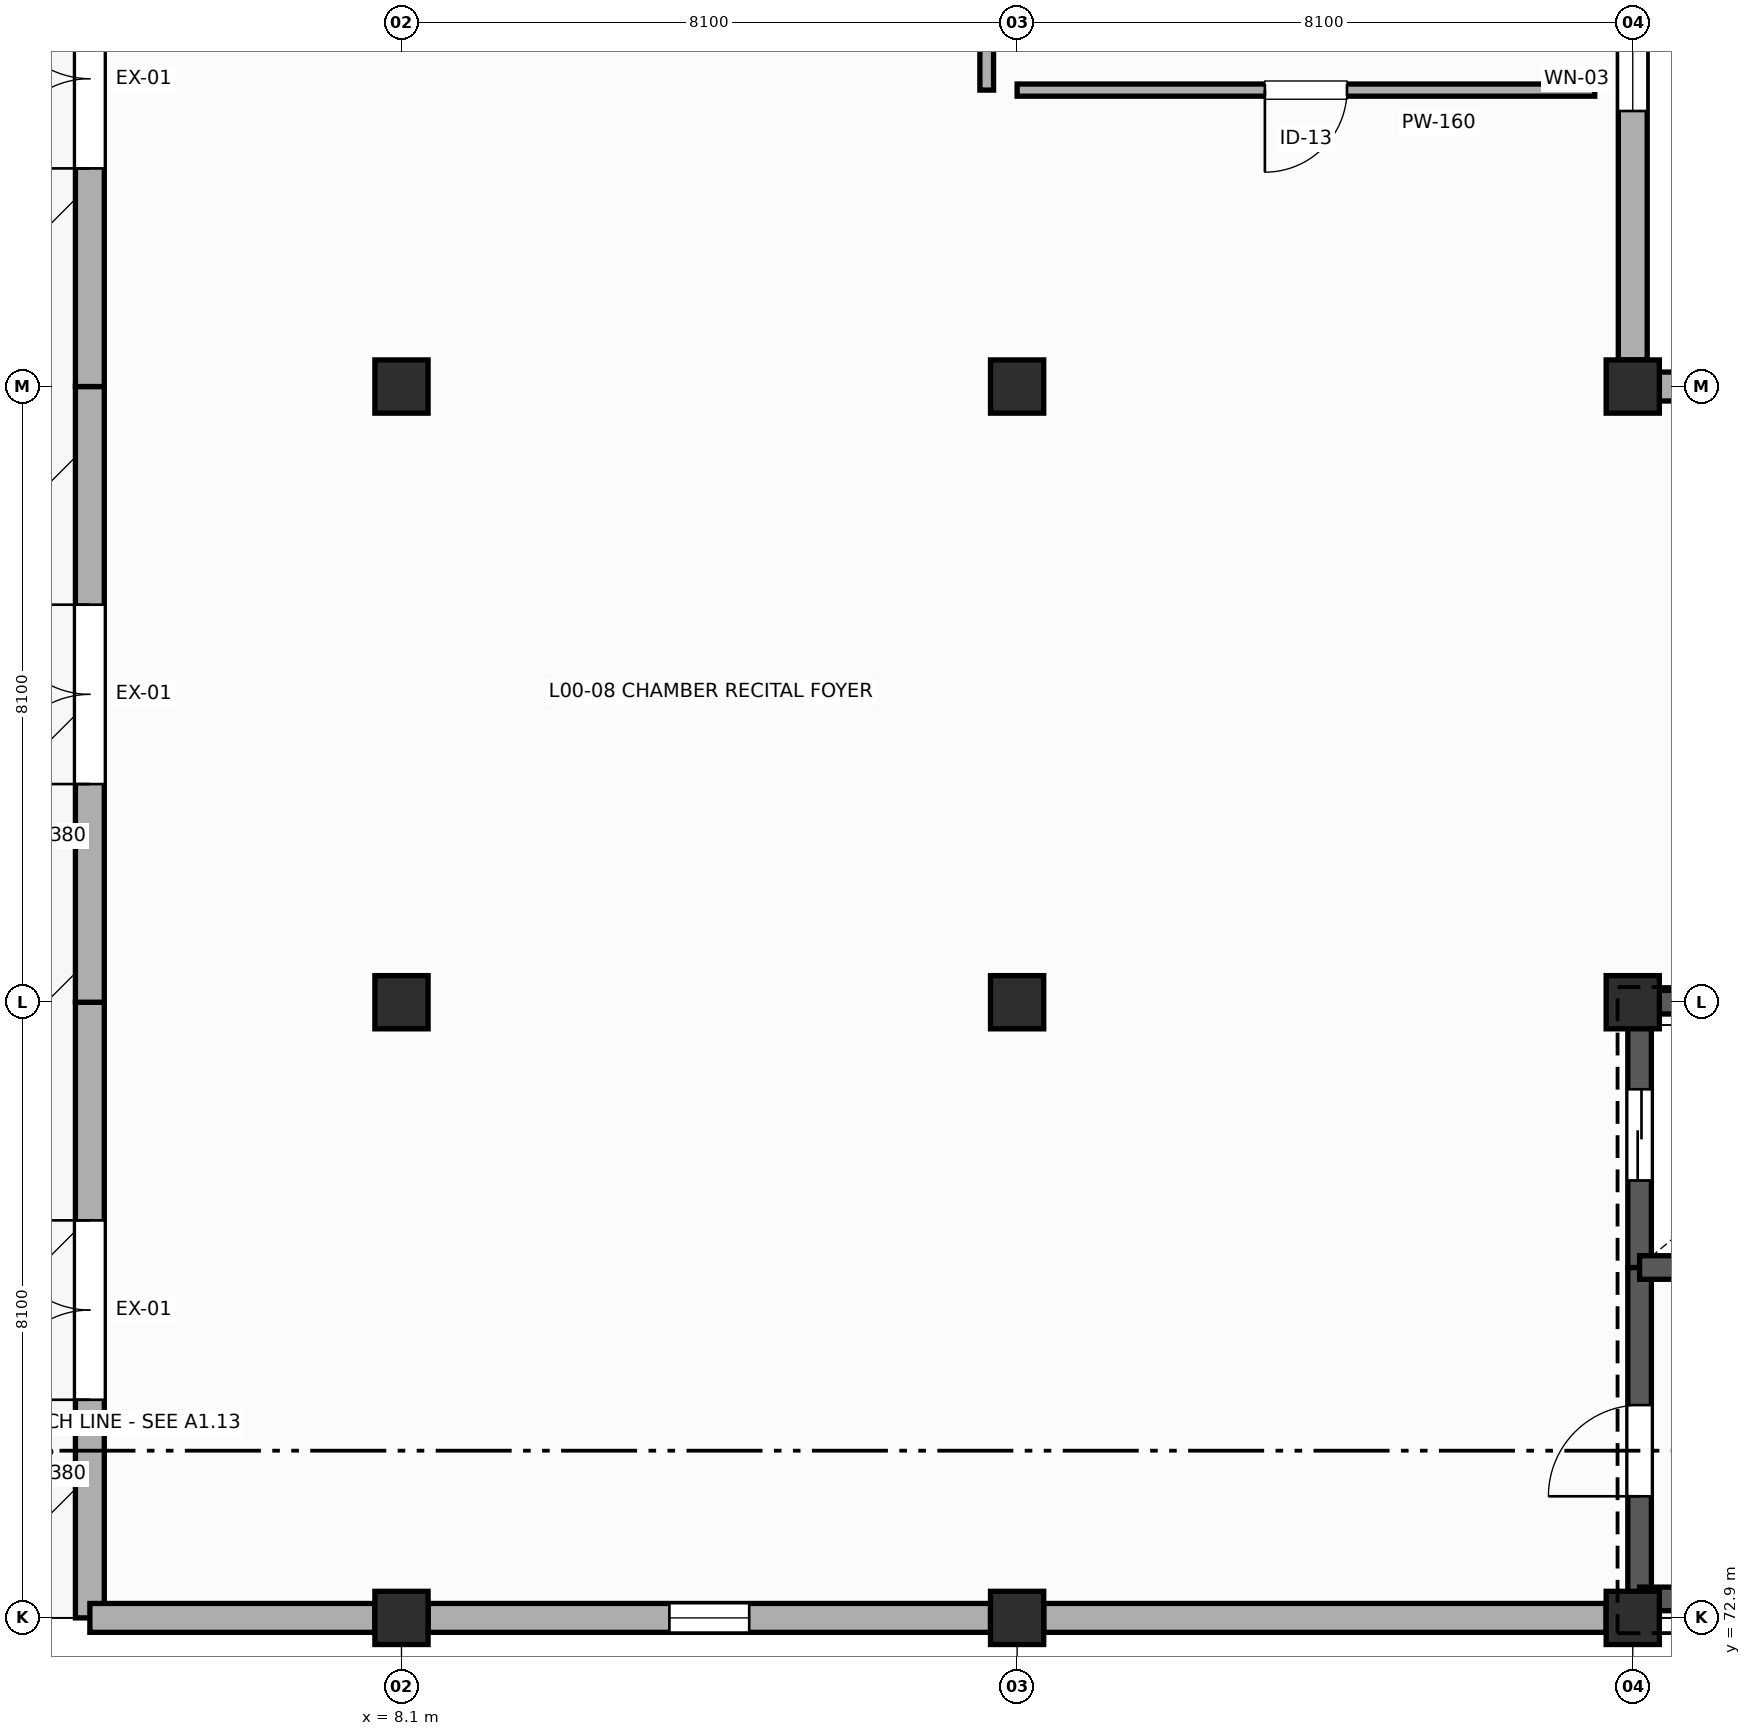
"""IFC4 building model, lengths in metres.
Left out: names, types, materials, properties, quantities, classifications, styles, units other than length and angle.
Written with IfcOpenShell. Run it as: python <this file> out.ifc"""

import sys

from ifc_helpers import new_model, si_unit, direction, frame, frame_2d, origin, origin_2d, place, context, subcontext, project, spatial, rectangle, extrude, element, fill, save


model = new_model("IFC4")
c1 = context("Model", 3, precision=1e-05, world=origin(), true_north=direction((0.0, 1.0)))
c2 = subcontext(c1, "Body", "Model", "MODEL_VIEW")
j1 = project(units=[si_unit("LENGTHUNIT", "METRE"), si_unit("PLANEANGLEUNIT", "RADIAN")], contexts=[c1])
p1 = place(None, origin())
s1 = spatial("IfcSite", under=j1, at=p1, CompositionType="ELEMENT")
p2 = place(p1, origin())
s2 = spatial("IfcBuilding", under=s1, at=p2, CompositionType="ELEMENT")
p3 = place(p2, origin())
s3 = spatial("IfcBuildingStorey", under=s2, at=p3, CompositionType="ELEMENT", Elevation=0.0)
for number, where, z_axis, x_axis in (
    (1, (8.1, 72.9, 0.0), (0.0, 0.0, 1.0), (1.0, 0.0, 0.0)),
    (2, (8.1, 81.0, 0.0), (0.0, 0.0, 1.0), (1.0, 0.0, 0.0)),
    (3, (8.1, 89.1, 0.0), (0.0, 0.0, 1.0), (1.0, 0.0, 0.0)),
    (4, (16.2, 72.9, 0.0), (0.0, 0.0, 1.0), (1.0, 0.0, 0.0)),
    (5, (16.2, 81.0, 0.0), (0.0, 0.0, 1.0), (1.0, 0.0, 0.0)),
    (6, (16.2, 89.1, 0.0), (0.0, 0.0, 1.0), (1.0, 0.0, 0.0)),
    (7, (24.3, 72.9, 0.0), (0.0, 0.0, 1.0), (1.0, 0.0, 0.0)),
    (8, (24.3, 81.0, 0.0), (0.0, 0.0, 1.0), (1.0, 0.0, 0.0)),
    (9, (24.3, 89.1, 0.0), (0.0, 0.0, 1.0), (1.0, 0.0, 0.0)),
):
    element("IfcColumn", number, at=place(p3, frame(where, z_axis=z_axis, x_axis=x_axis)), inside=s3, PredefinedType="COLUMN", context=c2, shape_type="SweptSolid", body=[
        extrude(rectangle(XDim=0.7, YDim=0.7, at=origin_2d()), origin(), (0.0, 0.0, 1.0), 5.4),
    ])
p4 = place(p3, frame((4.0, 72.9, 0.0), z_axis=(0.0, 0.0, 1.0), x_axis=(0.0, 1.0, 0.0)))
e10 = element("IfcWall", 10, at=p4, inside=s3, PredefinedType="SOLIDWALL", context=c2, shape_type="SweptSolid", body=[
    extrude(rectangle(XDim=8.1, YDim=0.38, at=frame_2d((4.05, 0.0))), origin(), (0.0, 0.0, 1.0), 5.05),
])
p5 = place(p4, frame((2.87, 0.0, 0.0)))
e11 = element("IfcOpeningElement", 11, at=p5, cuts=e10, PredefinedType="OPENING", context=c2, shape_type="SweptSolid", body=[
    extrude(rectangle(XDim=2.36, YDim=2.4, at=frame_2d((1.18, 1.2))), frame((0.0, 0.2, 0.0), z_axis=(0.0, -1.0, 0.0), x_axis=(1.0, 0.0, 0.0)), (0.0, 0.0, 1.0), 0.4),
])
p6 = place(p3, frame((4.0, 81.0, 0.0), z_axis=(0.0, 0.0, 1.0), x_axis=(0.0, 1.0, 0.0)))
e12 = element("IfcWall", 12, at=p6, inside=s3, PredefinedType="SOLIDWALL", context=c2, shape_type="SweptSolid", body=[
    extrude(rectangle(XDim=8.1, YDim=0.38, at=frame_2d((4.05, 0.0))), origin(), (0.0, 0.0, 1.0), 5.05),
])
p7 = place(p6, frame((2.87, 0.0, 0.0)))
e13 = element("IfcOpeningElement", 13, at=p7, cuts=e12, PredefinedType="OPENING", context=c2, shape_type="SweptSolid", body=[
    extrude(rectangle(XDim=2.36, YDim=2.4, at=frame_2d((1.18, 1.2))), frame((0.0, 0.2, 0.0), z_axis=(0.0, -1.0, 0.0), x_axis=(1.0, 0.0, 0.0)), (0.0, 0.0, 1.0), 0.4),
])
p8 = place(p3, frame((4.0, 89.1, 0.0), z_axis=(0.0, 0.0, 1.0), x_axis=(0.0, 1.0, 0.0)))
e14 = element("IfcWall", 14, at=p8, inside=s3, PredefinedType="SOLIDWALL", context=c2, shape_type="SweptSolid", body=[
    extrude(rectangle(XDim=8.1, YDim=0.38, at=frame_2d((4.05, 0.0))), origin(), (0.0, 0.0, 1.0), 5.05),
])
p9 = place(p8, frame((2.87, 0.0, 0.0)))
e15 = element("IfcOpeningElement", 15, at=p9, cuts=e14, PredefinedType="OPENING", context=c2, shape_type="SweptSolid", body=[
    extrude(rectangle(XDim=2.36, YDim=2.4, at=frame_2d((1.18, 1.2))), frame((0.0, 0.2, 0.0), z_axis=(0.0, -1.0, 0.0), x_axis=(1.0, 0.0, 0.0)), (0.0, 0.0, 1.0), 0.4),
])
p10 = place(p3, frame((32.0, 89.1, 0.0), z_axis=(0.0, 0.0, 1.0), x_axis=(-1.0, 0.0, 0.0)))
e16 = element("IfcWall", 16, at=p10, inside=s3, PredefinedType="SOLIDWALL", context=c2, shape_type="SweptSolid", body=[
    extrude(rectangle(XDim=7.35, YDim=0.38, at=frame_2d((3.675, 0.0))), origin(), (0.0, 0.0, 1.0), 4.625),
])
p11 = place(p10, frame((3.25, 0.0, 0.9)))
e17 = element("IfcOpeningElement", 17, at=p11, cuts=e16, PredefinedType="OPENING", context=c2, shape_type="SweptSolid", body=[
    extrude(rectangle(XDim=0.85, YDim=1.45, at=frame_2d((0.425, 0.725))), frame((0.0, 0.2, 0.0), z_axis=(0.0, -1.0, 0.0), x_axis=(1.0, 0.0, 0.0)), (0.0, 0.0, 1.0), 0.4),
])
p12 = place(p3, frame((24.3, 89.45, 0.0), z_axis=(0.0, 0.0, 1.0), x_axis=(0.0, 1.0, 0.0)))
e18 = element("IfcWall", 18, at=p12, inside=s3, PredefinedType="SOLIDWALL", context=c2, shape_type="SweptSolid", body=[
    extrude(rectangle(XDim=7.4, YDim=0.38, at=frame_2d((3.7, 0.0))), origin(), (0.0, 0.0, 1.0), 4.737),
])
p13 = place(p12, frame((3.275, 0.0, 0.9)))
e19 = element("IfcOpeningElement", 19, at=p13, cuts=e18, PredefinedType="OPENING", context=c2, shape_type="SweptSolid", body=[
    extrude(rectangle(XDim=0.85, YDim=1.75, at=frame_2d((0.425, 0.875))), frame((0.0, 0.2, 0.0), z_axis=(0.0, -1.0, 0.0), x_axis=(1.0, 0.0, 0.0)), (0.0, 0.0, 1.0), 0.4),
])
p14 = place(p3, frame((4.0, 72.9, 0.0), z_axis=(0.0, 0.0, 1.0), x_axis=(1.0, 0.0, 0.0)))
e20 = element("IfcWall", 20, at=p14, inside=s3, PredefinedType="SOLIDWALL", context=c2, shape_type="SweptSolid", body=[
    extrude(rectangle(XDim=3.75, YDim=0.38, at=frame_2d((1.875, 0.0))), origin(), (0.0, 0.0, 1.0), 4.677),
])
p15 = place(p3, frame((8.45, 72.9, 0.0), z_axis=(0.0, 0.0, 1.0), x_axis=(1.0, 0.0, 0.0)))
e21 = element("IfcWall", 21, at=p15, inside=s3, PredefinedType="SOLIDWALL", context=c2, shape_type="SweptSolid", body=[
    extrude(rectangle(XDim=7.4, YDim=0.38, at=frame_2d((3.7, 0.0))), origin(), (0.0, 0.0, 1.0), 4.625),
])
p16 = place(p15, frame((3.175, 0.0, 0.9)))
e22 = element("IfcOpeningElement", 22, at=p16, cuts=e21, PredefinedType="OPENING", context=c2, shape_type="SweptSolid", body=[
    extrude(rectangle(XDim=1.05, YDim=1.65, at=frame_2d((0.525, 0.825))), frame((0.0, 0.2, 0.0), z_axis=(0.0, -1.0, 0.0), x_axis=(1.0, 0.0, 0.0)), (0.0, 0.0, 1.0), 0.4),
])
p17 = place(p3, frame((16.55, 72.9, 0.0), z_axis=(0.0, 0.0, 1.0), x_axis=(1.0, 0.0, 0.0)))
e23 = element("IfcWall", 23, at=p17, inside=s3, PredefinedType="SOLIDWALL", context=c2, shape_type="SweptSolid", body=[
    extrude(rectangle(XDim=7.4, YDim=0.38, at=frame_2d((3.7, 0.0))), origin(), (0.0, 0.0, 1.0), 4.677),
])
p18 = place(p3, frame((24.39, 73.15, 0.0), z_axis=(0.0, 0.0, 1.0), x_axis=(0.0, 1.0, 0.0)))
e24 = element("IfcWall", 24, at=p18, inside=s3, PredefinedType="SHEAR", context=c2, shape_type="SweptSolid", body=[
    extrude(rectangle(XDim=4.36, YDim=0.31, at=frame_2d((2.18, 0.0))), origin(), (0.0, 0.0, 1.0), 5.4),
])
p19 = place(p18, frame((1.35, 0.0, 0.0)))
e25 = element("IfcOpeningElement", 25, at=p19, cuts=e24, PredefinedType="OPENING", context=c2, shape_type="SweptSolid", body=[
    extrude(rectangle(XDim=1.2, YDim=2.25, at=frame_2d((0.6, 1.125))), frame((0.0, 0.165, 0.0), z_axis=(0.0, -1.0, 0.0), x_axis=(1.0, 0.0, 0.0)), (0.0, 0.0, 1.0), 0.33),
])
p20 = place(p3, frame((24.39, 77.51, 0.0), z_axis=(0.0, 0.0, 1.0), x_axis=(0.0, 1.0, 0.0)))
e26 = element("IfcWall", 26, at=p20, inside=s3, PredefinedType="SHEAR", context=c2, shape_type="SweptSolid", body=[
    extrude(rectangle(XDim=3.49, YDim=0.31, at=frame_2d((1.745, 0.0))), origin(), (0.0, 0.0, 1.0), 5.4),
])
p21 = place(p20, frame((1.145, 0.0, 0.0)))
e27 = element("IfcOpeningElement", 27, at=p21, cuts=e26, PredefinedType="OPENING", context=c2, shape_type="SweptSolid", body=[
    extrude(rectangle(XDim=1.2, YDim=2.2, at=frame_2d((0.6, 1.1))), frame((0.0, 0.165, 0.0), z_axis=(0.0, -1.0, 0.0), x_axis=(1.0, 0.0, 0.0)), (0.0, 0.0, 1.0), 0.33),
])
p22 = place(p3, frame((24.39, 81.0, 0.0), z_axis=(0.0, 0.0, 1.0), x_axis=(1.0, 0.0, 0.0)))
e28 = element("IfcWall", 28, at=p22, inside=s3, PredefinedType="SHEAR", context=c2, shape_type="SweptSolid", body=[
    extrude(rectangle(XDim=3.96, YDim=0.31, at=frame_2d((1.98, 0.0))), origin(), (0.0, 0.0, 1.0), 5.4),
])
for number, where, z_axis, x_axis in (
    (29, (32.37, 73.15, 0.0), (0.0, 0.0, 1.0), (-1.0, 0.0, 0.0)),
    (30, (24.39, 77.51, 0.0), (0.0, 0.0, 1.0), (1.0, 0.0, 0.0)),
):
    element("IfcWall", number, at=place(p3, frame(where, z_axis=z_axis, x_axis=x_axis)), inside=s3, PredefinedType="SHEAR", context=c2, shape_type="SweptSolid", body=[
        extrude(rectangle(XDim=7.98, YDim=0.31, at=frame_2d((3.99, 0.0))), origin(), (0.0, 0.0, 1.0), 5.4),
    ])
p23 = place(p3, frame((15.8, 104.8, 0.0), z_axis=(0.0, 0.0, 1.0), x_axis=(0.0, -1.0, 0.0)))
e31 = element("IfcWall", 31, at=p23, inside=s3, PredefinedType="PARTITIONING", context=c2, shape_type="SweptSolid", body=[
    extrude(rectangle(XDim=11.8, YDim=0.18, at=frame_2d((5.9, 0.0))), origin(), (0.0, 0.0, 1.0), 5.12),
])
p24 = place(p23, frame((3.57, 0.0, 0.0)))
e32 = element("IfcOpeningElement", 32, at=p24, cuts=e31, PredefinedType="OPENING", context=c2, shape_type="SweptSolid", body=[
    extrude(rectangle(XDim=1.12, YDim=2.18, at=frame_2d((0.56, 1.09))), frame((0.0, 0.1, 0.0), z_axis=(0.0, -1.0, 0.0), x_axis=(1.0, 0.0, 0.0)), (0.0, 0.0, 1.0), 0.2),
])
p25 = place(p3, frame((23.8, 93.0, 0.0), z_axis=(0.0, 0.0, 1.0), x_axis=(-1.0, 0.0, 0.0)))
e33 = element("IfcWall", 33, at=p25, inside=s3, PredefinedType="PARTITIONING", context=c2, shape_type="SweptSolid", body=[
    extrude(rectangle(XDim=7.6, YDim=0.16, at=frame_2d((3.8, 0.0))), origin(), (0.0, 0.0, 1.0), 4.788),
])
p26 = place(p25, frame((3.26, 0.0, 0.0)))
e34 = element("IfcOpeningElement", 34, at=p26, cuts=e33, PredefinedType="OPENING", context=c2, shape_type="SweptSolid", body=[
    extrude(rectangle(XDim=1.08, YDim=2.15, at=frame_2d((0.54, 1.075))), frame((0.0, 0.09, 0.0), z_axis=(0.0, -1.0, 0.0), x_axis=(1.0, 0.0, 0.0)), (0.0, 0.0, 1.0), 0.18),
])
p27 = place(p5, origin())
e35 = element("IfcDoor", 35, at=p27, inside=s3, OperationType="DOUBLE_DOOR_SINGLE_SWING", PredefinedType="DOOR", context=c2, shape_type="SweptSolid", body=[
    extrude(rectangle(XDim=2.36, YDim=2.4, at=frame_2d((1.18, 1.2))), frame((0.0, 0.025, 0.0), z_axis=(0.0, -1.0, 0.0), x_axis=(1.0, 0.0, 0.0)), (0.0, 0.0, 1.0), 0.05),
])
fill(e11, e35)
p28 = place(p7, origin())
e36 = element("IfcDoor", 36, at=p28, inside=s3, OperationType="DOUBLE_DOOR_SINGLE_SWING", PredefinedType="DOOR", context=c2, shape_type="SweptSolid", body=[
    extrude(rectangle(XDim=2.36, YDim=2.4, at=frame_2d((1.18, 1.2))), frame((0.0, 0.025, 0.0), z_axis=(0.0, -1.0, 0.0), x_axis=(1.0, 0.0, 0.0)), (0.0, 0.0, 1.0), 0.05),
])
fill(e13, e36)
p29 = place(p9, origin())
e37 = element("IfcDoor", 37, at=p29, inside=s3, OperationType="DOUBLE_DOOR_SINGLE_SWING", PredefinedType="DOOR", context=c2, shape_type="SweptSolid", body=[
    extrude(rectangle(XDim=2.36, YDim=2.4, at=frame_2d((1.18, 1.2))), frame((0.0, 0.025, 0.0), z_axis=(0.0, -1.0, 0.0), x_axis=(1.0, 0.0, 0.0)), (0.0, 0.0, 1.0), 0.05),
])
fill(e15, e37)
p30 = place(p13, origin())
e38 = element("IfcWindow", 38, at=p30, inside=s3, PartitioningType="SINGLE_PANEL", PredefinedType="WINDOW", context=c2, shape_type="SweptSolid", body=[
    extrude(rectangle(XDim=0.85, YDim=1.75, at=frame_2d((0.425, 0.875))), frame((0.0, 0.03, 0.0), z_axis=(0.0, -1.0, 0.0), x_axis=(1.0, 0.0, 0.0)), (0.0, 0.0, 1.0), 0.06),
])
fill(e19, e38)
p31 = place(p16, origin())
e39 = element("IfcWindow", 39, at=p31, inside=s3, PartitioningType="SINGLE_PANEL", PredefinedType="WINDOW", context=c2, shape_type="SweptSolid", body=[
    extrude(rectangle(XDim=1.05, YDim=1.65, at=frame_2d((0.525, 0.825))), frame((0.0, 0.03, 0.0), z_axis=(0.0, -1.0, 0.0), x_axis=(1.0, 0.0, 0.0)), (0.0, 0.0, 1.0), 0.06),
])
fill(e22, e39)
p32 = place(p19, origin())
e40 = element("IfcDoor", 40, at=p32, inside=s3, OperationType="SINGLE_SWING_LEFT", PredefinedType="DOOR", context=c2, shape_type="SweptSolid", body=[
    extrude(rectangle(XDim=1.2, YDim=2.25, at=frame_2d((0.6, 1.125))), frame((0.0, 0.025, 0.0), z_axis=(0.0, -1.0, 0.0), x_axis=(1.0, 0.0, 0.0)), (0.0, 0.0, 1.0), 0.05),
])
fill(e25, e40)
p33 = place(p21, origin())
e41 = element("IfcDoor", 41, at=p33, inside=s3, OperationType="SLIDING_TO_LEFT", PredefinedType="DOOR", context=c2, shape_type="SweptSolid", body=[
    extrude(rectangle(XDim=1.2, YDim=2.2, at=frame_2d((0.6, 1.1))), frame((0.0, 0.025, 0.0), z_axis=(0.0, -1.0, 0.0), x_axis=(1.0, 0.0, 0.0)), (0.0, 0.0, 1.0), 0.05),
])
fill(e27, e41)
p34 = place(p26, origin())
e42 = element("IfcDoor", 42, at=p34, inside=s3, OperationType="SINGLE_SWING_RIGHT", PredefinedType="DOOR", context=c2, shape_type="SweptSolid", body=[
    extrude(rectangle(XDim=1.08, YDim=2.15, at=frame_2d((0.54, 1.075))), frame((0.0, 0.025, 0.0), z_axis=(0.0, -1.0, 0.0), x_axis=(1.0, 0.0, 0.0)), (0.0, 0.0, 1.0), 0.05),
])
fill(e34, e42)
save(model, sys.argv[1])
